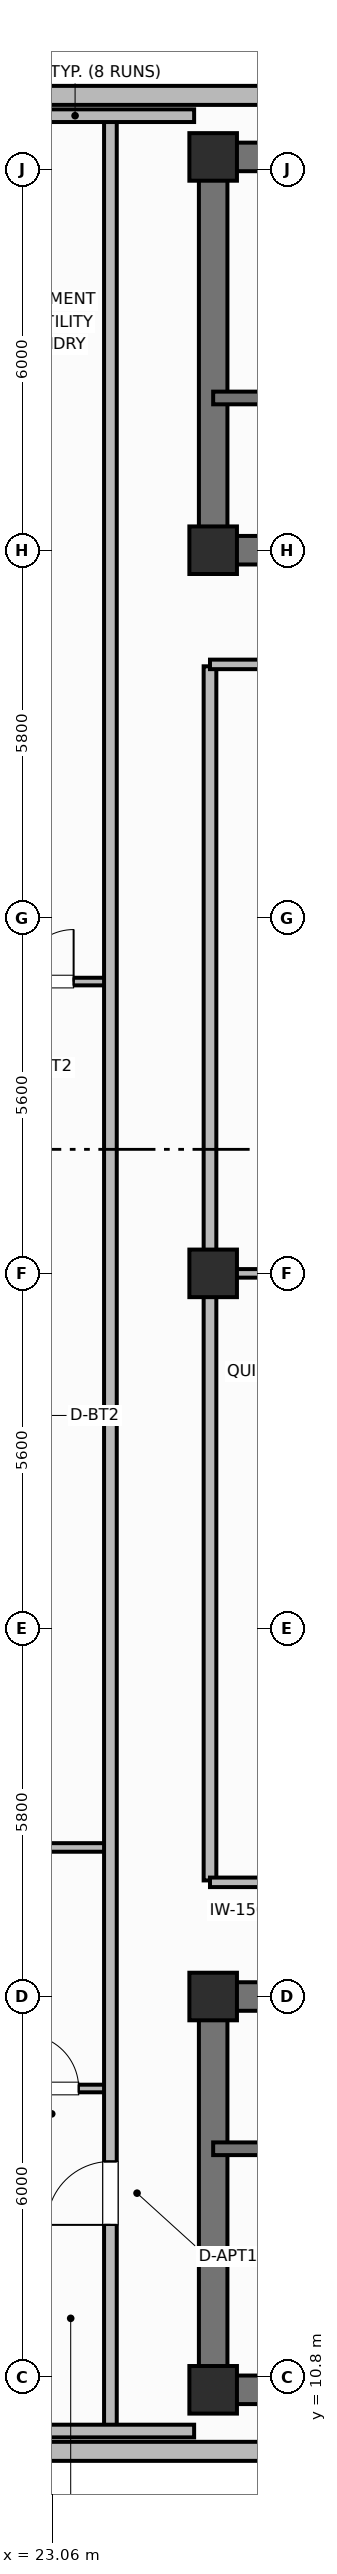
"""IFC4 building model, lengths in metres.
Left out: names, types, materials, properties, quantities, classifications, styles, units other than length and angle.
Written with IfcOpenShell. Run it as: python <this file> out.ifc"""

import sys

from ifc_helpers import new_model, si_unit, direction, frame, frame_2d, origin, origin_2d, place, context, subcontext, project, spatial, rectangle, extrude, element, fill, save


model = new_model("IFC4")
c1 = context("Model", 3, precision=1e-05, world=origin(), true_north=direction((0.0, 1.0)))
c2 = subcontext(c1, "Body", "Model", "MODEL_VIEW")
j1 = project(units=[si_unit("LENGTHUNIT", "METRE"), si_unit("PLANEANGLEUNIT", "RADIAN")], contexts=[c1])
p1 = place(None, origin())
s1 = spatial("IfcSite", under=j1, at=p1, CompositionType="ELEMENT")
p2 = place(p1, origin())
s2 = spatial("IfcBuilding", under=s1, at=p2, CompositionType="ELEMENT")
p3 = place(p2, frame((0.0, 0.0, 260.2)))
s3 = spatial("IfcBuildingStorey", under=s2, at=p3, CompositionType="ELEMENT", Elevation=260.2)
p4 = place(p3, frame((52.8, 10.6, 0.0), z_axis=(0.0, 0.0, 1.0), x_axis=(-1.0, 0.0, 0.0)))
e1 = element("IfcWall", 1, at=p4, inside=s3, PredefinedType="SHEAR", context=c2, shape_type="SweptSolid", body=[
    extrude(rectangle(XDim=27.2, YDim=0.45, at=frame_2d((13.6, 0.0))), origin(), (0.0, 0.0, 1.0), 3.7),
])
p5 = place(p3, frame((25.6, 10.825, 0.0), z_axis=(0.0, 0.0, 1.0), x_axis=(0.0, 1.0, 0.0)))
e2 = element("IfcWall", 2, at=p5, inside=s3, PredefinedType="SHEAR", context=c2, shape_type="SweptSolid", body=[
    extrude(rectangle(XDim=5.75, YDim=0.45, at=frame_2d((2.875, 0.0))), origin(), (0.0, 0.0, 1.0), 3.7),
])
p6 = place(p3, frame((25.6, 16.8, 0.0), z_axis=(0.0, 0.0, 1.0), x_axis=(1.0, 0.0, 0.0)))
e3 = element("IfcWall", 3, at=p6, inside=s3, PredefinedType="SHEAR", context=c2, shape_type="SweptSolid", body=[
    extrude(rectangle(XDim=27.2, YDim=0.45, at=frame_2d((13.6, 0.0))), origin(), (0.0, 0.0, 1.0), 3.7),
])
p7 = place(p6, frame((1.9, 0.0, 0.0)))
e4 = element("IfcOpeningElement", 4, at=p7, cuts=e3, PredefinedType="OPENING", context=c2, shape_type="SweptSolid", body=[
    extrude(rectangle(XDim=1.1, YDim=2.15, at=frame_2d((0.55, 1.075))), frame((0.0, 0.235, 0.0), z_axis=(0.0, -1.0, 0.0), x_axis=(1.0, 0.0, 0.0)), (0.0, 0.0, 1.0), 0.47),
])
p8 = place(p6, frame((13.0, 0.0, 0.0)))
e5 = element("IfcOpeningElement", 5, at=p8, cuts=e3, PredefinedType="OPENING", context=c2, shape_type="SweptSolid", body=[
    extrude(rectangle(XDim=1.2, YDim=2.15, at=frame_2d((0.6, 1.075))), frame((0.0, 0.235, 0.0), z_axis=(0.0, -1.0, 0.0), x_axis=(1.0, 0.0, 0.0)), (0.0, 0.0, 1.0), 0.47),
])
p9 = place(p6, frame((21.6, 0.0, 0.0)))
e6 = element("IfcOpeningElement", 6, at=p9, cuts=e3, PredefinedType="OPENING", context=c2, shape_type="SweptSolid", body=[
    extrude(rectangle(XDim=1.0, YDim=2.15, at=frame_2d((0.5, 1.075))), frame((0.0, 0.235, 0.0), z_axis=(0.0, -1.0, 0.0), x_axis=(1.0, 0.0, 0.0)), (0.0, 0.0, 1.0), 0.47),
])
p10 = place(p3, frame((25.6, 45.8, 0.0), z_axis=(0.0, 0.0, 1.0), x_axis=(1.0, 0.0, 0.0)))
e7 = element("IfcWall", 7, at=p10, inside=s3, PredefinedType="SHEAR", context=c2, shape_type="SweptSolid", body=[
    extrude(rectangle(XDim=27.2, YDim=0.45, at=frame_2d((13.6, 0.0))), origin(), (0.0, 0.0, 1.0), 3.7),
])
p11 = place(p3, frame((25.6, 39.825, 0.0), z_axis=(0.0, 0.0, 1.0), x_axis=(0.0, 1.0, 0.0)))
e8 = element("IfcWall", 8, at=p11, inside=s3, PredefinedType="SHEAR", context=c2, shape_type="SweptSolid", body=[
    extrude(rectangle(XDim=5.75, YDim=0.45, at=frame_2d((2.875, 0.0))), origin(), (0.0, 0.0, 1.0), 3.7),
])
p12 = place(p3, frame((52.8, 39.6, 0.0), z_axis=(0.0, 0.0, 1.0), x_axis=(-1.0, 0.0, 0.0)))
e9 = element("IfcWall", 9, at=p12, inside=s3, PredefinedType="SHEAR", context=c2, shape_type="SweptSolid", body=[
    extrude(rectangle(XDim=27.2, YDim=0.45, at=frame_2d((13.6, 0.0))), origin(), (0.0, 0.0, 1.0), 3.7),
])
p13 = place(p12, frame((24.2, 0.0, 0.0)))
e10 = element("IfcOpeningElement", 10, at=p13, cuts=e9, PredefinedType="OPENING", context=c2, shape_type="SweptSolid", body=[
    extrude(rectangle(XDim=1.1, YDim=2.15, at=frame_2d((0.55, 1.075))), frame((0.0, 0.235, 0.0), z_axis=(0.0, -1.0, 0.0), x_axis=(1.0, 0.0, 0.0)), (0.0, 0.0, 1.0), 0.47),
])
p14 = place(p12, frame((15.1, 0.0, 0.0)))
e11 = element("IfcOpeningElement", 11, at=p14, cuts=e9, PredefinedType="OPENING", context=c2, shape_type="SweptSolid", body=[
    extrude(rectangle(XDim=1.2, YDim=2.15, at=frame_2d((0.6, 1.075))), frame((0.0, 0.235, 0.0), z_axis=(0.0, -1.0, 0.0), x_axis=(1.0, 0.0, 0.0)), (0.0, 0.0, 1.0), 0.47),
])
p15 = place(p12, frame((11.6, 0.0, 0.0)))
e12 = element("IfcOpeningElement", 12, at=p15, cuts=e9, PredefinedType="OPENING", context=c2, shape_type="SweptSolid", body=[
    extrude(rectangle(XDim=0.9, YDim=2.1, at=frame_2d((0.45, 1.05))), frame((0.0, 0.235, 0.0), z_axis=(0.0, -1.0, 0.0), x_axis=(1.0, 0.0, 0.0)), (0.0, 0.0, 1.0), 0.47),
])
p16 = place(p12, frame((7.35, 0.0, 0.0)))
e13 = element("IfcOpeningElement", 13, at=p16, cuts=e9, PredefinedType="OPENING", context=c2, shape_type="SweptSolid", body=[
    extrude(rectangle(XDim=0.85, YDim=2.1, at=frame_2d((0.425, 1.05))), frame((0.0, 0.235, 0.0), z_axis=(0.0, -1.0, 0.0), x_axis=(1.0, 0.0, 0.0)), (0.0, 0.0, 1.0), 0.47),
])
p17 = place(p12, frame((4.2, 0.0, 0.0)))
e14 = element("IfcOpeningElement", 14, at=p17, cuts=e9, PredefinedType="OPENING", context=c2, shape_type="SweptSolid", body=[
    extrude(rectangle(XDim=1.3, YDim=2.2, at=frame_2d((0.65, 1.1))), frame((0.0, 0.235, 0.0), z_axis=(0.0, -1.0, 0.0), x_axis=(1.0, 0.0, 0.0)), (0.0, 0.0, 1.0), 0.47),
])
for number, where, z_axis, x_axis in (
    (15, (25.6, 10.6, 0.0), (0.0, 0.0, 1.0), (1.0, 0.0, 0.0)),
    (16, (25.6, 16.8, 0.0), (0.0, 0.0, 1.0), (1.0, 0.0, 0.0)),
    (17, (25.6, 39.6, 0.0), (0.0, 0.0, 1.0), (1.0, 0.0, 0.0)),
    (18, (25.6, 45.8, 0.0), (0.0, 0.0, 1.0), (1.0, 0.0, 0.0)),
    (19, (25.6, 28.2, 0.0), (0.0, 0.0, 1.0), (1.0, 0.0, 0.0)),
):
    element("IfcColumn", number, at=place(p3, frame(where, z_axis=z_axis, x_axis=x_axis)), inside=s3, PredefinedType="COLUMN", context=c2, shape_type="SweptSolid", body=[
        extrude(rectangle(XDim=0.75, YDim=0.75, at=origin_2d()), origin(), (0.0, 0.0, 1.0), 3.7),
    ])
p18 = place(p3, frame((22.56, 9.63, 0.0), z_axis=(0.0, 0.0, 1.0), x_axis=(1.0, 0.0, 0.0)))
e20 = element("IfcWall", 20, at=p18, inside=s3, PredefinedType="SOLIDWALL", context=c2, shape_type="SweptSolid", body=[
    extrude(rectangle(XDim=33.28, YDim=0.3, at=frame_2d((16.64, 0.0))), origin(), (0.0, 0.0, 1.0), 2.73),
])
p19 = place(p18, frame((5.08, 0.0, 0.76)))
e21 = element("IfcOpeningElement", 21, at=p19, cuts=e20, PredefinedType="OPENING", context=c2, shape_type="SweptSolid", body=[
    extrude(rectangle(XDim=1.8, YDim=1.85, at=frame_2d((0.9, 0.925))), frame((0.0, 0.16, 0.0), z_axis=(0.0, -1.0, 0.0), x_axis=(1.0, 0.0, 0.0)), (0.0, 0.0, 1.0), 0.32),
])
p20 = place(p18, frame((8.633, 0.0, 0.76)))
e22 = element("IfcOpeningElement", 22, at=p20, cuts=e20, PredefinedType="OPENING", context=c2, shape_type="SweptSolid", body=[
    extrude(rectangle(XDim=1.8, YDim=1.85, at=frame_2d((0.9, 0.925))), frame((0.0, 0.16, 0.0), z_axis=(0.0, -1.0, 0.0), x_axis=(1.0, 0.0, 0.0)), (0.0, 0.0, 1.0), 0.32),
])
p21 = place(p18, frame((15.74, 0.0, 0.76)))
e23 = element("IfcOpeningElement", 23, at=p21, cuts=e20, PredefinedType="OPENING", context=c2, shape_type="SweptSolid", body=[
    extrude(rectangle(XDim=1.8, YDim=1.85, at=frame_2d((0.9, 0.925))), frame((0.0, 0.16, 0.0), z_axis=(0.0, -1.0, 0.0), x_axis=(1.0, 0.0, 0.0)), (0.0, 0.0, 1.0), 0.32),
])
p22 = place(p18, frame((22.847, 0.0, 0.76)))
e24 = element("IfcOpeningElement", 24, at=p22, cuts=e20, PredefinedType="OPENING", context=c2, shape_type="SweptSolid", body=[
    extrude(rectangle(XDim=1.8, YDim=1.85, at=frame_2d((0.9, 0.925))), frame((0.0, 0.16, 0.0), z_axis=(0.0, -1.0, 0.0), x_axis=(1.0, 0.0, 0.0)), (0.0, 0.0, 1.0), 0.32),
])
p23 = place(p18, frame((26.4, 0.0, 0.76)))
e25 = element("IfcOpeningElement", 25, at=p23, cuts=e20, PredefinedType="OPENING", context=c2, shape_type="SweptSolid", body=[
    extrude(rectangle(XDim=1.8, YDim=1.85, at=frame_2d((0.9, 0.925))), frame((0.0, 0.16, 0.0), z_axis=(0.0, -1.0, 0.0), x_axis=(1.0, 0.0, 0.0)), (0.0, 0.0, 1.0), 0.32),
])
p24 = place(p3, frame((55.84, 46.77, 0.0), z_axis=(0.0, 0.0, 1.0), x_axis=(-1.0, 0.0, 0.0)))
e26 = element("IfcWall", 26, at=p24, inside=s3, PredefinedType="SOLIDWALL", context=c2, shape_type="SweptSolid", body=[
    extrude(rectangle(XDim=33.28, YDim=0.3, at=frame_2d((16.64, 0.0))), origin(), (0.0, 0.0, 1.0), 2.73),
])
p25 = place(p24, frame((4.461, 0.0, 0.95)))
e27 = element("IfcOpeningElement", 27, at=p25, cuts=e26, PredefinedType="OPENING", context=c2, shape_type="SweptSolid", body=[
    extrude(rectangle(XDim=1.1, YDim=1.65, at=frame_2d((0.55, 0.825))), frame((0.0, 0.16, 0.0), z_axis=(0.0, -1.0, 0.0), x_axis=(1.0, 0.0, 0.0)), (0.0, 0.0, 1.0), 0.32),
])
p26 = place(p24, frame((7.368, 0.0, 0.95)))
e28 = element("IfcOpeningElement", 28, at=p26, cuts=e26, PredefinedType="OPENING", context=c2, shape_type="SweptSolid", body=[
    extrude(rectangle(XDim=1.1, YDim=1.65, at=frame_2d((0.55, 0.825))), frame((0.0, 0.16, 0.0), z_axis=(0.0, -1.0, 0.0), x_axis=(1.0, 0.0, 0.0)), (0.0, 0.0, 1.0), 0.32),
])
p27 = place(p24, frame((10.275, 0.0, 0.95)))
e29 = element("IfcOpeningElement", 29, at=p27, cuts=e26, PredefinedType="OPENING", context=c2, shape_type="SweptSolid", body=[
    extrude(rectangle(XDim=1.1, YDim=1.65, at=frame_2d((0.55, 0.825))), frame((0.0, 0.16, 0.0), z_axis=(0.0, -1.0, 0.0), x_axis=(1.0, 0.0, 0.0)), (0.0, 0.0, 1.0), 0.32),
])
p28 = place(p24, frame((13.883, 0.0, 0.95)))
e30 = element("IfcOpeningElement", 30, at=p28, cuts=e26, PredefinedType="OPENING", context=c2, shape_type="SweptSolid", body=[
    extrude(rectangle(XDim=1.1, YDim=1.65, at=frame_2d((0.55, 0.825))), frame((0.0, 0.16, 0.0), z_axis=(0.0, -1.0, 0.0), x_axis=(1.0, 0.0, 0.0)), (0.0, 0.0, 1.0), 0.32),
])
p29 = place(p24, frame((16.09, 0.0, 0.95)))
e31 = element("IfcOpeningElement", 31, at=p29, cuts=e26, PredefinedType="OPENING", context=c2, shape_type="SweptSolid", body=[
    extrude(rectangle(XDim=1.1, YDim=1.65, at=frame_2d((0.55, 0.825))), frame((0.0, 0.16, 0.0), z_axis=(0.0, -1.0, 0.0), x_axis=(1.0, 0.0, 0.0)), (0.0, 0.0, 1.0), 0.32),
])
p30 = place(p24, frame((18.297, 0.0, 0.95)))
e32 = element("IfcOpeningElement", 32, at=p30, cuts=e26, PredefinedType="OPENING", context=c2, shape_type="SweptSolid", body=[
    extrude(rectangle(XDim=1.1, YDim=1.65, at=frame_2d((0.55, 0.825))), frame((0.0, 0.16, 0.0), z_axis=(0.0, -1.0, 0.0), x_axis=(1.0, 0.0, 0.0)), (0.0, 0.0, 1.0), 0.32),
])
p31 = place(p24, frame((21.905, 0.0, 0.95)))
e33 = element("IfcOpeningElement", 33, at=p31, cuts=e26, PredefinedType="OPENING", context=c2, shape_type="SweptSolid", body=[
    extrude(rectangle(XDim=1.1, YDim=1.65, at=frame_2d((0.55, 0.825))), frame((0.0, 0.16, 0.0), z_axis=(0.0, -1.0, 0.0), x_axis=(1.0, 0.0, 0.0)), (0.0, 0.0, 1.0), 0.32),
])
p32 = place(p24, frame((24.812, 0.0, 0.95)))
e34 = element("IfcOpeningElement", 34, at=p32, cuts=e26, PredefinedType="OPENING", context=c2, shape_type="SweptSolid", body=[
    extrude(rectangle(XDim=1.1, YDim=1.65, at=frame_2d((0.55, 0.825))), frame((0.0, 0.16, 0.0), z_axis=(0.0, -1.0, 0.0), x_axis=(1.0, 0.0, 0.0)), (0.0, 0.0, 1.0), 0.32),
])
p33 = place(p24, frame((27.719, 0.0, 0.95)))
e35 = element("IfcOpeningElement", 35, at=p33, cuts=e26, PredefinedType="OPENING", context=c2, shape_type="SweptSolid", body=[
    extrude(rectangle(XDim=1.1, YDim=1.65, at=frame_2d((0.55, 0.825))), frame((0.0, 0.16, 0.0), z_axis=(0.0, -1.0, 0.0), x_axis=(1.0, 0.0, 0.0)), (0.0, 0.0, 1.0), 0.32),
])
p34 = place(p3, frame((25.6, 14.4, 0.0), z_axis=(0.0, 0.0, 1.0), x_axis=(1.0, 0.0, 0.0)))
e36 = element("IfcWall", 36, at=p34, inside=s3, PredefinedType="SHEAR", context=c2, shape_type="SweptSolid", body=[
    extrude(rectangle(XDim=9.55, YDim=0.2, at=frame_2d((4.775, 0.0))), origin(), (0.0, 0.0, 1.0), 3.7),
])
p35 = place(p34, frame((1.05, 0.0, 0.0)))
e37 = element("IfcOpeningElement", 37, at=p35, cuts=e36, PredefinedType="OPENING", context=c2, shape_type="SweptSolid", body=[
    extrude(rectangle(XDim=1.1, YDim=2.15, at=frame_2d((0.55, 1.075))), frame((0.0, 0.11, 0.0), z_axis=(0.0, -1.0, 0.0), x_axis=(1.0, 0.0, 0.0)), (0.0, 0.0, 1.0), 0.22),
])
p36 = place(p3, frame((35.15, 42.0, 0.0), z_axis=(0.0, 0.0, 1.0), x_axis=(-1.0, 0.0, 0.0)))
e38 = element("IfcWall", 38, at=p36, inside=s3, PredefinedType="SHEAR", context=c2, shape_type="SweptSolid", body=[
    extrude(rectangle(XDim=9.55, YDim=0.2, at=frame_2d((4.775, 0.0))), origin(), (0.0, 0.0, 1.0), 3.7),
])
p37 = place(p36, frame((7.25, 0.0, 0.0)))
e39 = element("IfcOpeningElement", 39, at=p37, cuts=e38, PredefinedType="OPENING", context=c2, shape_type="SweptSolid", body=[
    extrude(rectangle(XDim=1.1, YDim=2.15, at=frame_2d((0.55, 1.075))), frame((0.0, 0.11, 0.0), z_axis=(0.0, -1.0, 0.0), x_axis=(1.0, 0.0, 0.0)), (0.0, 0.0, 1.0), 0.22),
])
p38 = place(p3, frame((25.55, 18.63, 0.0), z_axis=(0.0, 0.0, 1.0), x_axis=(0.0, 1.0, 0.0)))
e40 = element("IfcWall", 40, at=p38, inside=s3, PredefinedType="PARTITIONING", context=c2, shape_type="SweptSolid", body=[
    extrude(rectangle(XDim=19.14, YDim=0.2, at=frame_2d((9.57, 0.0))), origin(), (0.0, 0.0, 1.0), 2.56),
])
for number, where, z_axis, x_axis in (
    (41, (25.55, 18.6, 0.0), (0.0, 0.0, 1.0), (1.0, 0.0, 0.0)),
    (42, (25.55, 37.8, 0.0), (0.0, 0.0, 1.0), (1.0, 0.0, 0.0)),
):
    element("IfcWall", number, at=place(p3, frame(where, z_axis=z_axis, x_axis=x_axis)), inside=s3, PredefinedType="PARTITIONING", context=c2, shape_type="SweptSolid", body=[
        extrude(rectangle(XDim=2.7, YDim=0.15, at=frame_2d((1.35, 0.0))), origin(), (0.0, 0.0, 1.0), 2.56),
    ])
p39 = place(p3, frame((25.6, 28.2, 0.0), z_axis=(0.0, 0.0, 1.0), x_axis=(1.0, 0.0, 0.0)))
e43 = element("IfcWall", 43, at=p39, inside=s3, PredefinedType="PARTITIONING", context=c2, shape_type="SweptSolid", body=[
    extrude(rectangle(XDim=2.66, YDim=0.135, at=frame_2d((1.33, 0.0))), origin(), (0.0, 0.0, 1.0), 2.56),
])
p40 = place(p3, frame((22.03, 15.35, 0.0), z_axis=(0.0, 0.0, 1.0), x_axis=(1.0, 0.0, 0.0)))
e44 = element("IfcWall", 44, at=p40, inside=s3, PredefinedType="PARTITIONING", context=c2, shape_type="SweptSolid", body=[
    extrude(rectangle(XDim=1.95, YDim=0.12, at=frame_2d((0.975, 0.0))), origin(), (0.0, 0.0, 1.0), 2.56),
])
p41 = place(p40, frame((0.6, 0.0, 0.0)))
e45 = element("IfcOpeningElement", 45, at=p41, cuts=e44, PredefinedType="OPENING", context=c2, shape_type="SweptSolid", body=[
    extrude(rectangle(XDim=0.85, YDim=2.1, at=frame_2d((0.425, 1.05))), frame((0.0, 0.07, 0.0), z_axis=(0.0, -1.0, 0.0), x_axis=(1.0, 0.0, 0.0)), (0.0, 0.0, 1.0), 0.14),
])
p42 = place(p3, frame((22.03, 19.15, 0.0), z_axis=(0.0, 0.0, 1.0), x_axis=(1.0, 0.0, 0.0)))
e46 = element("IfcWall", 46, at=p42, inside=s3, PredefinedType="PARTITIONING", context=c2, shape_type="SweptSolid", body=[
    extrude(rectangle(XDim=1.95, YDim=0.135, at=frame_2d((0.975, 0.0))), origin(), (0.0, 0.0, 1.0), 2.56),
])
p43 = place(p3, frame((22.03, 32.8, 0.0), z_axis=(0.0, 0.0, 1.0), x_axis=(1.0, 0.0, 0.0)))
e47 = element("IfcWall", 47, at=p43, inside=s3, PredefinedType="PARTITIONING", context=c2, shape_type="SweptSolid", body=[
    extrude(rectangle(XDim=1.95, YDim=0.12, at=frame_2d((0.975, 0.0))), origin(), (0.0, 0.0, 1.0), 2.56),
])
p44 = place(p43, frame((0.55, 0.0, 0.0)))
e48 = element("IfcOpeningElement", 48, at=p44, cuts=e47, PredefinedType="OPENING", context=c2, shape_type="SweptSolid", body=[
    extrude(rectangle(XDim=0.82, YDim=2.08, at=frame_2d((0.41, 1.04))), frame((0.0, 0.07, 0.0), z_axis=(0.0, -1.0, 0.0), x_axis=(1.0, 0.0, 0.0)), (0.0, 0.0, 1.0), 0.14),
])
p45 = place(p3, frame((23.98, 9.95, 0.0), z_axis=(0.0, 0.0, 1.0), x_axis=(0.0, 1.0, 0.0)))
e49 = element("IfcWall", 49, at=p45, inside=s3, PredefinedType="PARTITIONING", context=c2, shape_type="SweptSolid", body=[
    extrude(rectangle(XDim=36.5, YDim=0.2, at=frame_2d((18.25, 0.0))), origin(), (0.0, 0.0, 1.0), 2.56),
])
p46 = place(p45, frame((3.25, 0.0, 0.0)))
e50 = element("IfcOpeningElement", 50, at=p46, cuts=e49, PredefinedType="OPENING", context=c2, shape_type="SweptSolid", body=[
    extrude(rectangle(XDim=1.0, YDim=2.15, at=frame_2d((0.5, 1.075))), frame((0.0, 0.11, 0.0), z_axis=(0.0, -1.0, 0.0), x_axis=(1.0, 0.0, 0.0)), (0.0, 0.0, 1.0), 0.22),
])
for number, where, z_axis, x_axis in (
    (51, (21.546, 9.95, 0.0), (0.0, 0.0, 1.0), (1.0, 0.0, 0.0)),
    (52, (21.546, 46.45, 0.0), (0.0, 0.0, 1.0), (1.0, 0.0, 0.0)),
):
    element("IfcWall", number, at=place(p3, frame(where, z_axis=z_axis, x_axis=x_axis)), inside=s3, PredefinedType="PARTITIONING", context=c2, shape_type="SweptSolid", body=[
        extrude(rectangle(XDim=3.754, YDim=0.2, at=frame_2d((1.877, 0.0))), origin(), (0.0, 0.0, 1.0), 2.56),
    ])
p47 = place(p41, origin())
e53 = element("IfcDoor", 53, at=p47, inside=s3, OperationType="SINGLE_SWING_LEFT", PredefinedType="DOOR", context=c2, shape_type="SweptSolid", body=[
    extrude(rectangle(XDim=0.85, YDim=2.1, at=frame_2d((0.425, 1.05))), frame((0.0, 0.025, 0.0), z_axis=(0.0, -1.0, 0.0), x_axis=(1.0, 0.0, 0.0)), (0.0, 0.0, 1.0), 0.05),
])
fill(e45, e53)
p48 = place(p44, origin())
e54 = element("IfcDoor", 54, at=p48, inside=s3, OperationType="SINGLE_SWING_RIGHT", PredefinedType="DOOR", context=c2, shape_type="SweptSolid", body=[
    extrude(rectangle(XDim=0.82, YDim=2.08, at=frame_2d((0.41, 1.04))), frame((0.0, 0.025, 0.0), z_axis=(0.0, -1.0, 0.0), x_axis=(1.0, 0.0, 0.0)), (0.0, 0.0, 1.0), 0.05),
])
fill(e48, e54)
p49 = place(p46, origin())
e55 = element("IfcDoor", 55, at=p49, inside=s3, OperationType="SINGLE_SWING_LEFT", PredefinedType="DOOR", context=c2, shape_type="SweptSolid", body=[
    extrude(rectangle(XDim=1.0, YDim=2.15, at=frame_2d((0.5, 1.075))), frame((0.0, 0.025, 0.0), z_axis=(0.0, -1.0, 0.0), x_axis=(1.0, 0.0, 0.0)), (0.0, 0.0, 1.0), 0.05),
])
fill(e50, e55)
save(model, sys.argv[1])
